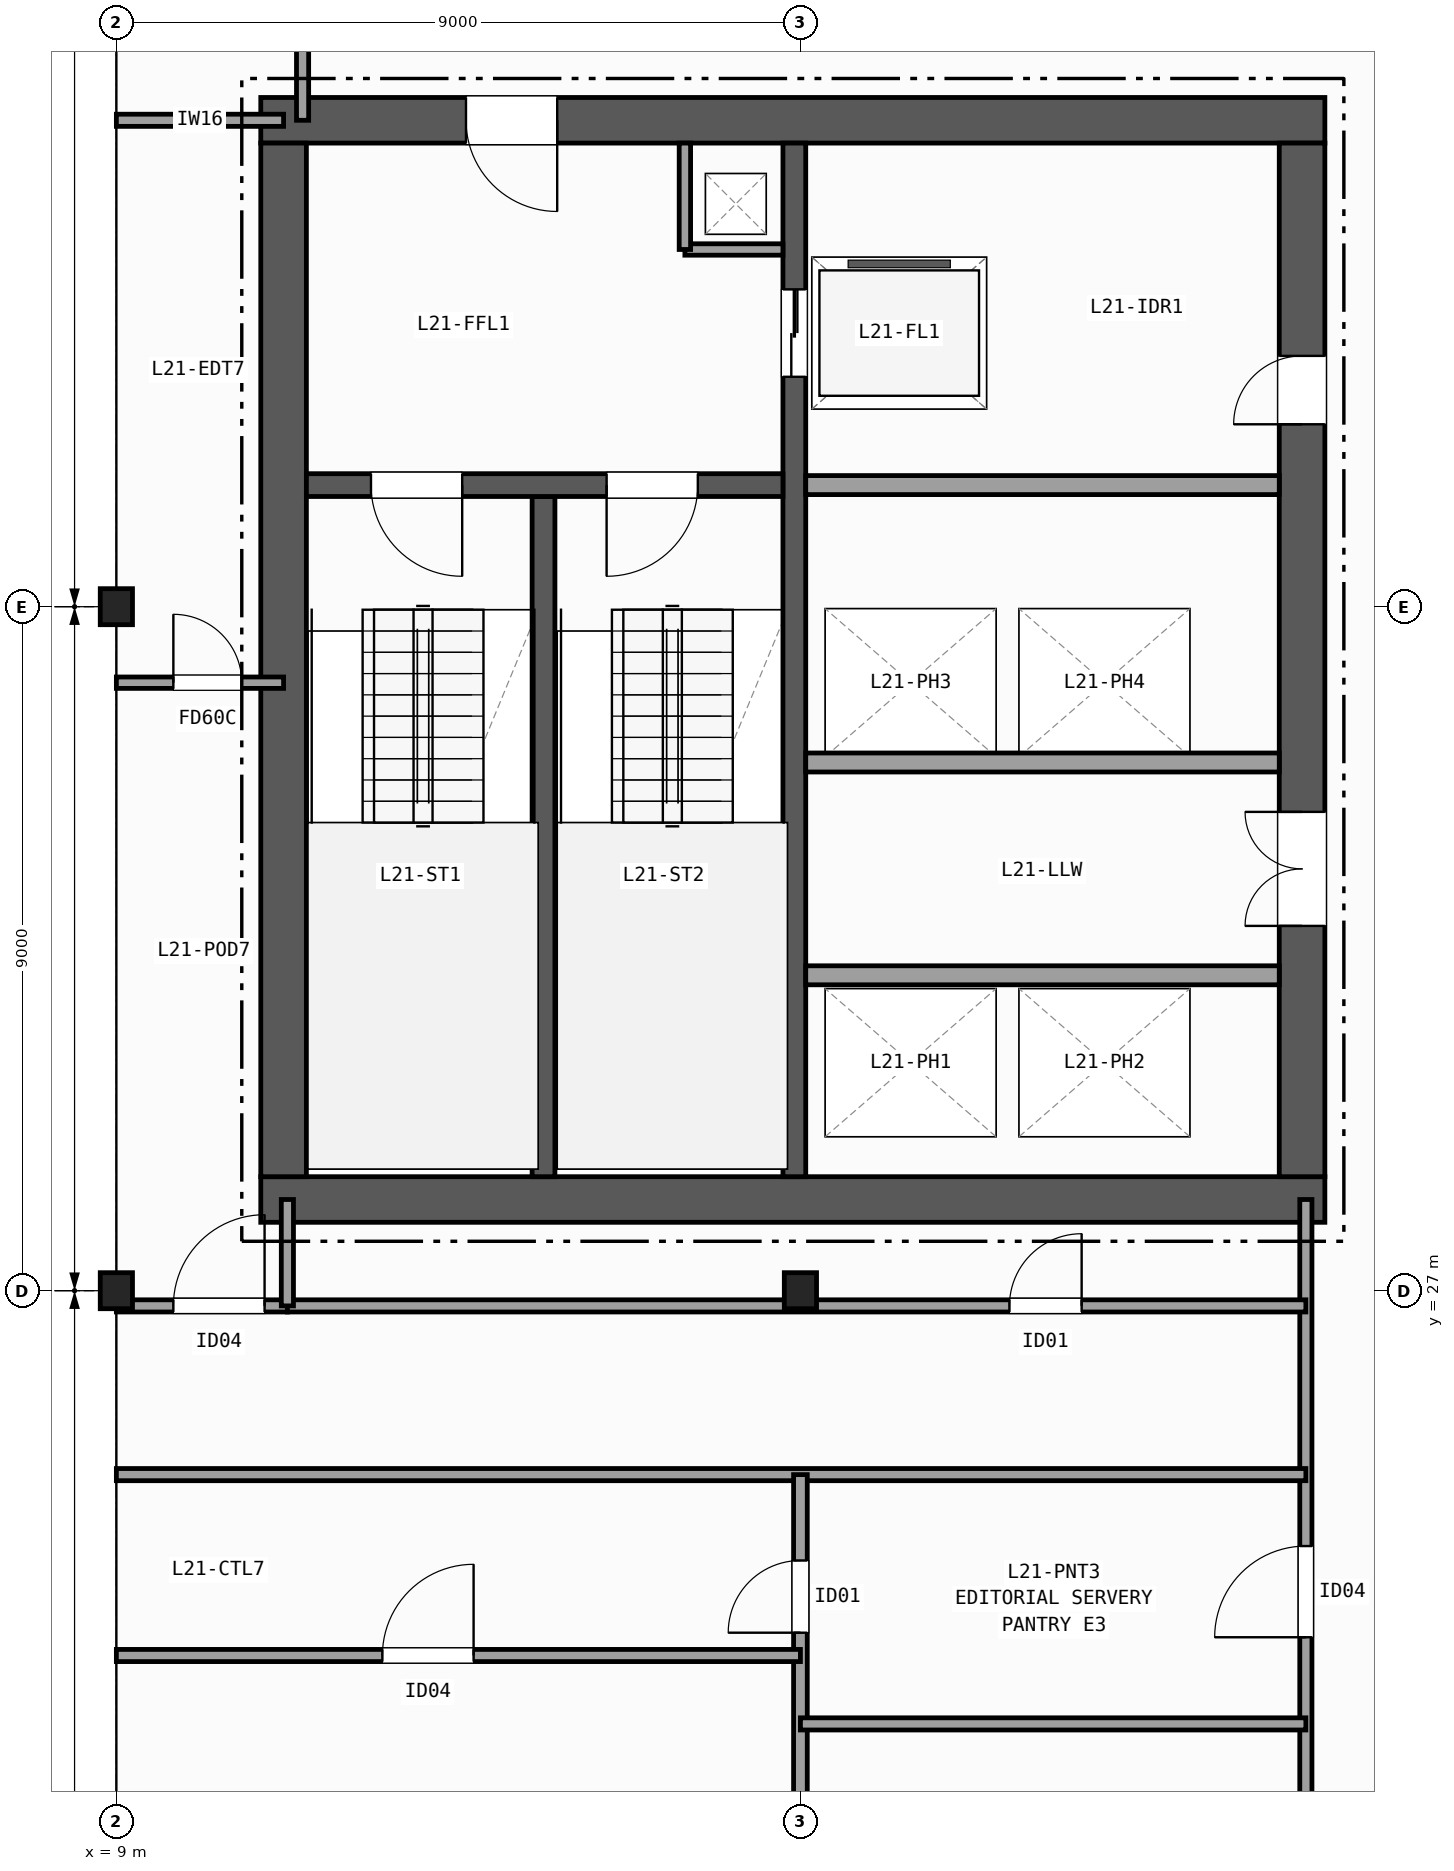
"""IFC4 building model, lengths in metres.
Left out: names, types, materials, properties, quantities, classifications, styles, units other than length and angle.
Written with IfcOpenShell. Run it as: python <this file> out.ifc"""

import sys

from ifc_helpers import new_model, si_unit, direction, frame, frame_2d, origin, origin_2d, place, context, subcontext, project, spatial, rectangle, i_section, extrude, element, fill, save


model = new_model("IFC4")
c1 = context("Model", 3, precision=1e-05, world=origin(), true_north=direction((0.0, 1.0)))
c2 = subcontext(c1, "Body", "Model", "MODEL_VIEW")
j1 = project(units=[si_unit("LENGTHUNIT", "METRE"), si_unit("PLANEANGLEUNIT", "RADIAN")], contexts=[c1])
p1 = place(None, origin())
s1 = spatial("IfcSite", under=j1, at=p1, CompositionType="ELEMENT")
p2 = place(p1, origin())
s2 = spatial("IfcBuilding", under=s1, at=p2, CompositionType="ELEMENT")
p3 = place(p2, frame((0.0, 0.0, 89.1)))
s3 = spatial("IfcBuildingStorey", under=s2, at=p3, CompositionType="ELEMENT", Elevation=89.1)
for number, where, z_axis, x_axis in (
    (1, (9.0, 27.0, 0.0), (0.0, 0.0, 1.0), (1.0, 0.0, 0.0)),
    (2, (9.0, 36.0, 0.0), (0.0, 0.0, 1.0), (1.0, 0.0, 0.0)),
    (3, (18.0, 27.0, 0.0), (0.0, 0.0, 1.0), (1.0, 0.0, 0.0)),
):
    element("IfcColumn", number, at=place(p3, frame(where, z_axis=z_axis, x_axis=x_axis)), inside=s3, PredefinedType="COLUMN", context=c2, shape_type="SweptSolid", body=[
        extrude(i_section(OverallWidth=0.424, OverallDepth=0.474, WebThickness=0.048, FlangeThickness=0.077, FilletRadius=0.015, at=origin_2d()), origin(), (0.0, 0.0, 1.0), 3.7),
    ])
p4 = place(p3, frame((10.9, 28.2, 0.0), z_axis=(0.0, 0.0, 1.0), x_axis=(1.0, 0.0, 0.0)))
e4 = element("IfcWall", 4, at=p4, inside=s3, PredefinedType="SHEAR", context=c2, shape_type="SweptSolid", body=[
    extrude(rectangle(XDim=14.0, YDim=0.6, at=frame_2d((7.0, 0.0))), origin(), (0.0, 0.0, 1.0), 3.42),
])
p5 = place(p3, frame((24.9, 42.4, 0.0), z_axis=(0.0, 0.0, 1.0), x_axis=(-1.0, 0.0, 0.0)))
e5 = element("IfcWall", 5, at=p5, inside=s3, PredefinedType="SHEAR", context=c2, shape_type="SweptSolid", body=[
    extrude(rectangle(XDim=14.0, YDim=0.6, at=frame_2d((7.0, 0.0))), origin(), (0.0, 0.0, 1.0), 3.42),
])
p6 = place(p5, frame((10.1, 0.0, 0.0)))
e6 = element("IfcOpeningElement", 6, at=p6, cuts=e5, PredefinedType="OPENING", context=c2, shape_type="SweptSolid", body=[
    extrude(rectangle(XDim=1.2, YDim=2.15, at=frame_2d((0.6, 1.075))), frame((0.0, 0.31, 0.0), z_axis=(0.0, -1.0, 0.0), x_axis=(1.0, 0.0, 0.0)), (0.0, 0.0, 1.0), 0.62),
])
p7 = place(p3, frame((11.2, 42.1, 0.0), z_axis=(0.0, 0.0, 1.0), x_axis=(0.0, -1.0, 0.0)))
e7 = element("IfcWall", 7, at=p7, inside=s3, PredefinedType="SHEAR", context=c2, shape_type="SweptSolid", body=[
    extrude(rectangle(XDim=13.6, YDim=0.6, at=frame_2d((6.8, 0.0))), origin(), (0.0, 0.0, 1.0), 3.42),
])
p8 = place(p3, frame((24.6, 28.5, 0.0), z_axis=(0.0, 0.0, 1.0), x_axis=(0.0, 1.0, 0.0)))
e8 = element("IfcWall", 8, at=p8, inside=s3, PredefinedType="SHEAR", context=c2, shape_type="SweptSolid", body=[
    extrude(rectangle(XDim=13.6, YDim=0.6, at=frame_2d((6.8, 0.0))), origin(), (0.0, 0.0, 1.0), 3.42),
])
p9 = place(p8, frame((3.3, 0.0, 0.0)))
e9 = element("IfcOpeningElement", 9, at=p9, cuts=e8, PredefinedType="OPENING", context=c2, shape_type="SweptSolid", body=[
    extrude(rectangle(XDim=1.5, YDim=2.2, at=frame_2d((0.75, 1.1))), frame((0.0, 0.31, 0.0), z_axis=(0.0, -1.0, 0.0), x_axis=(1.0, 0.0, 0.0)), (0.0, 0.0, 1.0), 0.62),
])
p10 = place(p8, frame((9.9, 0.0, 0.0)))
e10 = element("IfcOpeningElement", 10, at=p10, cuts=e8, PredefinedType="OPENING", context=c2, shape_type="SweptSolid", body=[
    extrude(rectangle(XDim=0.9, YDim=2.1, at=frame_2d((0.45, 1.05))), frame((0.0, 0.31, 0.0), z_axis=(0.0, -1.0, 0.0), x_axis=(1.0, 0.0, 0.0)), (0.0, 0.0, 1.0), 0.62),
])
p11 = place(p3, frame((14.62, 28.5, 0.0), z_axis=(0.0, 0.0, 1.0), x_axis=(0.0, 1.0, 0.0)))
e11 = element("IfcWall", 11, at=p11, inside=s3, PredefinedType="SHEAR", context=c2, shape_type="SweptSolid", body=[
    extrude(rectangle(XDim=8.95, YDim=0.3, at=frame_2d((4.475, 0.0))), origin(), (0.0, 0.0, 1.0), 3.42),
])
p12 = place(p3, frame((17.92, 42.1, 0.0), z_axis=(0.0, 0.0, 1.0), x_axis=(0.0, -1.0, 0.0)))
e12 = element("IfcWall", 12, at=p12, inside=s3, PredefinedType="SHEAR", context=c2, shape_type="SweptSolid", body=[
    extrude(rectangle(XDim=13.6, YDim=0.3, at=frame_2d((6.8, 0.0))), origin(), (0.0, 0.0, 1.0), 3.42),
])
p13 = place(p12, frame((1.925, 0.0, 0.0)))
e13 = element("IfcOpeningElement", 13, at=p13, cuts=e12, PredefinedType="OPENING", context=c2, shape_type="SweptSolid", body=[
    extrude(rectangle(XDim=1.15, YDim=2.15, at=frame_2d((0.575, 1.075))), frame((0.0, 0.16, 0.0), z_axis=(0.0, -1.0, 0.0), x_axis=(1.0, 0.0, 0.0)), (0.0, 0.0, 1.0), 0.32),
])
p14 = place(p3, frame((17.77, 37.6, 0.0), z_axis=(0.0, 0.0, 1.0), x_axis=(-1.0, 0.0, 0.0)))
e14 = element("IfcWall", 14, at=p14, inside=s3, PredefinedType="SHEAR", context=c2, shape_type="SweptSolid", body=[
    extrude(rectangle(XDim=6.27, YDim=0.3, at=frame_2d((3.135, 0.0))), origin(), (0.0, 0.0, 1.0), 3.42),
])
p15 = place(p14, frame((4.22, 0.0, 0.0)))
e15 = element("IfcOpeningElement", 15, at=p15, cuts=e14, PredefinedType="OPENING", context=c2, shape_type="SweptSolid", body=[
    extrude(rectangle(XDim=1.2, YDim=2.15, at=frame_2d((0.6, 1.075))), frame((0.0, 0.16, 0.0), z_axis=(0.0, -1.0, 0.0), x_axis=(1.0, 0.0, 0.0)), (0.0, 0.0, 1.0), 0.32),
])
p16 = place(p14, frame((1.12, 0.0, 0.0)))
e16 = element("IfcOpeningElement", 16, at=p16, cuts=e14, PredefinedType="OPENING", context=c2, shape_type="SweptSolid", body=[
    extrude(rectangle(XDim=1.2, YDim=2.15, at=frame_2d((0.6, 1.075))), frame((0.0, 0.16, 0.0), z_axis=(0.0, -1.0, 0.0), x_axis=(1.0, 0.0, 0.0)), (0.0, 0.0, 1.0), 0.32),
])
p17 = place(p3, frame((16.48, 40.7, 0.0), z_axis=(0.0, 0.0, 1.0), x_axis=(1.0, 0.0, 0.0)))
e17 = element("IfcWall", 17, at=p17, inside=s3, PredefinedType="PARTITIONING", context=c2, shape_type="SweptSolid", body=[
    extrude(rectangle(XDim=1.29, YDim=0.15, at=frame_2d((0.645, 0.0))), origin(), (0.0, 0.0, 1.0), 3.42),
])
p18 = place(p3, frame((16.48, 40.7, 0.0), z_axis=(0.0, 0.0, 1.0), x_axis=(0.0, 1.0, 0.0)))
e18 = element("IfcWall", 18, at=p18, inside=s3, PredefinedType="PARTITIONING", context=c2, shape_type="SweptSolid", body=[
    extrude(rectangle(XDim=1.4, YDim=0.15, at=frame_2d((0.7, 0.0))), origin(), (0.0, 0.0, 1.0), 3.42),
])
for number, where, z_axis, x_axis in (
    (19, (18.07, 37.6, 0.0), (0.0, 0.0, 1.0), (1.0, 0.0, 0.0)),
    (20, (18.07, 31.15, 0.0), (0.0, 0.0, 1.0), (1.0, 0.0, 0.0)),
    (21, (24.3, 33.95, 0.0), (0.0, 0.0, 1.0), (-1.0, 0.0, 0.0)),
):
    element("IfcWall", number, at=place(p3, frame(where, z_axis=z_axis, x_axis=x_axis)), inside=s3, PredefinedType="PARTITIONING", context=c2, shape_type="SweptSolid", body=[
        extrude(rectangle(XDim=6.23, YDim=0.25, at=frame_2d((3.115, 0.0))), origin(), (0.0, 0.0, 1.0), 3.42),
    ])
p19 = place(p3, frame((9.0, 26.8, 0.0), z_axis=(0.0, 0.0, 1.0), x_axis=(1.0, 0.0, 0.0)))
e22 = element("IfcWall", 22, at=p19, inside=s3, PredefinedType="PARTITIONING", context=c2, shape_type="SweptSolid", body=[
    extrude(rectangle(XDim=2.25, YDim=0.16, at=frame_2d((1.125, 0.0))), origin(), (0.0, 0.0, 1.0), 2.627),
])
p20 = place(p19, frame((0.75, 0.0, 0.0)))
e23 = element("IfcOpeningElement", 23, at=p20, cuts=e22, PredefinedType="OPENING", context=c2, shape_type="SweptSolid", body=[
    extrude(rectangle(XDim=1.2, YDim=2.15, at=frame_2d((0.6, 1.075))), frame((0.0, 0.09, 0.0), z_axis=(0.0, -1.0, 0.0), x_axis=(1.0, 0.0, 0.0)), (0.0, 0.0, 1.0), 0.18),
])
p21 = place(p3, frame((9.0, 42.4, 0.0), z_axis=(0.0, 0.0, 1.0), x_axis=(1.0, 0.0, 0.0)))
e24 = element("IfcWall", 24, at=p21, inside=s3, PredefinedType="PARTITIONING", context=c2, shape_type="SweptSolid", body=[
    extrude(rectangle(XDim=2.2, YDim=0.16, at=frame_2d((1.1, 0.0))), origin(), (0.0, 0.0, 1.0), 2.627),
])
p22 = place(p3, frame((11.45, 42.4, 0.0), z_axis=(0.0, 0.0, 1.0), x_axis=(0.0, 1.0, 0.0)))
e25 = element("IfcWall", 25, at=p22, inside=s3, PredefinedType="PARTITIONING", context=c2, shape_type="SweptSolid", body=[
    extrude(rectangle(XDim=2.1, YDim=0.16, at=frame_2d((1.05, 0.0))), origin(), (0.0, 0.0, 1.0), 3.42),
])
p23 = place(p3, frame((9.0, 35.0, 0.0), z_axis=(0.0, 0.0, 1.0), x_axis=(1.0, 0.0, 0.0)))
e26 = element("IfcWall", 26, at=p23, inside=s3, PredefinedType="PARTITIONING", context=c2, shape_type="SweptSolid", body=[
    extrude(rectangle(XDim=2.2, YDim=0.15, at=frame_2d((1.1, 0.0))), origin(), (0.0, 0.0, 1.0), 2.627),
])
p24 = place(p23, frame((0.75, 0.0, 0.0)))
e27 = element("IfcOpeningElement", 27, at=p24, cuts=e26, PredefinedType="OPENING", context=c2, shape_type="SweptSolid", body=[
    extrude(rectangle(XDim=0.9, YDim=2.1, at=frame_2d((0.45, 1.05))), frame((0.0, 0.085, 0.0), z_axis=(0.0, -1.0, 0.0), x_axis=(1.0, 0.0, 0.0)), (0.0, 0.0, 1.0), 0.17),
])
p25 = place(p3, frame((24.65, 9.0, 0.0), z_axis=(0.0, 0.0, 1.0), x_axis=(0.0, 1.0, 0.0)))
e28 = element("IfcWall", 28, at=p25, inside=s3, PredefinedType="PARTITIONING", context=c2, shape_type="SweptSolid", body=[
    extrude(rectangle(XDim=19.2, YDim=0.16, at=frame_2d((9.6, 0.0))), origin(), (0.0, 0.0, 1.0), 2.627),
])
p26 = place(p25, frame((2.8, 0.0, 0.0)))
e29 = element("IfcOpeningElement", 29, at=p26, cuts=e28, PredefinedType="OPENING", context=c2, shape_type="SweptSolid", body=[
    extrude(rectangle(XDim=1.0, YDim=2.1, at=frame_2d((0.5, 1.05))), frame((0.0, 0.09, 0.0), z_axis=(0.0, -1.0, 0.0), x_axis=(1.0, 0.0, 0.0)), (0.0, 0.0, 1.0), 0.18),
])
p27 = place(p25, frame((8.95, 0.0, 0.0)))
e30 = element("IfcOpeningElement", 30, at=p27, cuts=e28, PredefinedType="OPENING", context=c2, shape_type="SweptSolid", body=[
    extrude(rectangle(XDim=1.05, YDim=2.15, at=frame_2d((0.525, 1.075))), frame((0.0, 0.09, 0.0), z_axis=(0.0, -1.0, 0.0), x_axis=(1.0, 0.0, 0.0)), (0.0, 0.0, 1.0), 0.18),
])
p28 = place(p25, frame((13.44, 0.0, 0.0)))
e31 = element("IfcOpeningElement", 31, at=p28, cuts=e28, PredefinedType="OPENING", context=c2, shape_type="SweptSolid", body=[
    extrude(rectangle(XDim=1.2, YDim=2.15, at=frame_2d((0.6, 1.075))), frame((0.0, 0.09, 0.0), z_axis=(0.0, -1.0, 0.0), x_axis=(1.0, 0.0, 0.0)), (0.0, 0.0, 1.0), 0.18),
])
p29 = place(p3, frame((9.0, 24.58, 0.0), z_axis=(0.0, 0.0, 1.0), x_axis=(1.0, 0.0, 0.0)))
e32 = element("IfcWall", 32, at=p29, inside=s3, PredefinedType="PARTITIONING", context=c2, shape_type="SweptSolid", body=[
    extrude(rectangle(XDim=15.65, YDim=0.16, at=frame_2d((7.825, 0.0))), origin(), (0.0, 0.0, 1.0), 2.627),
])
p30 = place(p3, frame((11.25, 26.8, 0.0), z_axis=(0.0, 0.0, 1.0), x_axis=(1.0, 0.0, 0.0)))
e33 = element("IfcWall", 33, at=p30, inside=s3, PredefinedType="PARTITIONING", context=c2, shape_type="SweptSolid", body=[
    extrude(rectangle(XDim=13.4, YDim=0.16, at=frame_2d((6.7, 0.0))), origin(), (0.0, 0.0, 1.0), 2.789),
])
p31 = place(p30, frame((9.5, 0.0, 0.0)))
e34 = element("IfcOpeningElement", 34, at=p31, cuts=e33, PredefinedType="OPENING", context=c2, shape_type="SweptSolid", body=[
    extrude(rectangle(XDim=0.95, YDim=2.1, at=frame_2d((0.475, 1.05))), frame((0.0, 0.09, 0.0), z_axis=(0.0, -1.0, 0.0), x_axis=(1.0, 0.0, 0.0)), (0.0, 0.0, 1.0), 0.18),
])
p32 = place(p3, frame((11.25, 26.8, 0.0), z_axis=(0.0, 0.0, 1.0), x_axis=(0.0, 1.0, 0.0)))
e35 = element("IfcWall", 35, at=p32, inside=s3, PredefinedType="PARTITIONING", context=c2, shape_type="SweptSolid", body=[
    extrude(rectangle(XDim=1.4, YDim=0.16, at=frame_2d((0.7, 0.0))), origin(), (0.0, 0.0, 1.0), 2.789),
])
p33 = place(p3, frame((18.0, 9.0, 0.0), z_axis=(0.0, 0.0, 1.0), x_axis=(0.0, 1.0, 0.0)))
e36 = element("IfcWall", 36, at=p33, inside=s3, PredefinedType="PARTITIONING", context=c2, shape_type="SweptSolid", body=[
    extrude(rectangle(XDim=15.58, YDim=0.18, at=frame_2d((7.79, 0.0))), origin(), (0.0, 0.0, 1.0), 2.627),
])
p34 = place(p33, frame((2.2, 0.0, 0.0)))
e37 = element("IfcOpeningElement", 37, at=p34, cuts=e36, PredefinedType="OPENING", context=c2, shape_type="SweptSolid", body=[
    extrude(rectangle(XDim=0.86, YDim=2.05, at=frame_2d((0.43, 1.025))), frame((0.0, 0.1, 0.0), z_axis=(0.0, -1.0, 0.0), x_axis=(1.0, 0.0, 0.0)), (0.0, 0.0, 1.0), 0.2),
])
p35 = place(p33, frame((13.5, 0.0, 0.0)))
e38 = element("IfcOpeningElement", 38, at=p35, cuts=e36, PredefinedType="OPENING", context=c2, shape_type="SweptSolid", body=[
    extrude(rectangle(XDim=0.95, YDim=2.1, at=frame_2d((0.475, 1.05))), frame((0.0, 0.1, 0.0), z_axis=(0.0, -1.0, 0.0), x_axis=(1.0, 0.0, 0.0)), (0.0, 0.0, 1.0), 0.2),
])
p36 = place(p3, frame((18.0, 21.3, 0.0), z_axis=(0.0, 0.0, 1.0), x_axis=(1.0, 0.0, 0.0)))
e39 = element("IfcWall", 39, at=p36, inside=s3, PredefinedType="PARTITIONING", context=c2, shape_type="SweptSolid", body=[
    extrude(rectangle(XDim=6.65, YDim=0.16, at=frame_2d((3.325, 0.0))), origin(), (0.0, 0.0, 1.0), 2.792),
])
p37 = place(p3, frame((9.0, 22.2, 0.0), z_axis=(0.0, 0.0, 1.0), x_axis=(1.0, 0.0, 0.0)))
e40 = element("IfcWall", 40, at=p37, inside=s3, PredefinedType="PARTITIONING", context=c2, shape_type="SweptSolid", body=[
    extrude(rectangle(XDim=9.0, YDim=0.16, at=frame_2d((4.5, 0.0))), origin(), (0.0, 0.0, 1.0), 2.627),
])
p38 = place(p37, frame((3.5, 0.0, 0.0)))
e41 = element("IfcOpeningElement", 41, at=p38, cuts=e40, PredefinedType="OPENING", context=c2, shape_type="SweptSolid", body=[
    extrude(rectangle(XDim=1.2, YDim=2.15, at=frame_2d((0.6, 1.075))), frame((0.0, 0.09, 0.0), z_axis=(0.0, -1.0, 0.0), x_axis=(1.0, 0.0, 0.0)), (0.0, 0.0, 1.0), 0.18),
])
p39 = place(p15, origin())
e42 = element("IfcDoor", 42, at=p39, inside=s3, OperationType="SINGLE_SWING_LEFT", PredefinedType="DOOR", context=c2, shape_type="SweptSolid", body=[
    extrude(rectangle(XDim=1.2, YDim=2.15, at=frame_2d((0.6, 1.075))), frame((0.0, 0.025, 0.0), z_axis=(0.0, -1.0, 0.0), x_axis=(1.0, 0.0, 0.0)), (0.0, 0.0, 1.0), 0.05),
])
fill(e15, e42)
p40 = place(p16, origin())
e43 = element("IfcDoor", 43, at=p40, inside=s3, OperationType="SINGLE_SWING_RIGHT", PredefinedType="DOOR", context=c2, shape_type="SweptSolid", body=[
    extrude(rectangle(XDim=1.2, YDim=2.15, at=frame_2d((0.6, 1.075))), frame((0.0, 0.025, 0.0), z_axis=(0.0, -1.0, 0.0), x_axis=(1.0, 0.0, 0.0)), (0.0, 0.0, 1.0), 0.05),
])
fill(e16, e43)
p41 = place(p9, origin())
e44 = element("IfcDoor", 44, at=p41, inside=s3, OperationType="DOUBLE_DOOR_SINGLE_SWING", PredefinedType="DOOR", context=c2, shape_type="SweptSolid", body=[
    extrude(rectangle(XDim=1.5, YDim=2.2, at=frame_2d((0.75, 1.1))), frame((0.0, 0.025, 0.0), z_axis=(0.0, -1.0, 0.0), x_axis=(1.0, 0.0, 0.0)), (0.0, 0.0, 1.0), 0.05),
])
fill(e9, e44)
p42 = place(p6, origin())
e45 = element("IfcDoor", 45, at=p42, inside=s3, OperationType="SINGLE_SWING_LEFT", PredefinedType="DOOR", context=c2, shape_type="SweptSolid", body=[
    extrude(rectangle(XDim=1.2, YDim=2.15, at=frame_2d((0.6, 1.075))), frame((0.0, 0.025, 0.0), z_axis=(0.0, -1.0, 0.0), x_axis=(1.0, 0.0, 0.0)), (0.0, 0.0, 1.0), 0.05),
])
fill(e6, e45)
p43 = place(p10, origin())
e46 = element("IfcDoor", 46, at=p43, inside=s3, OperationType="SINGLE_SWING_LEFT", PredefinedType="DOOR", context=c2, shape_type="SweptSolid", body=[
    extrude(rectangle(XDim=0.9, YDim=2.1, at=frame_2d((0.45, 1.05))), frame((0.0, 0.025, 0.0), z_axis=(0.0, -1.0, 0.0), x_axis=(1.0, 0.0, 0.0)), (0.0, 0.0, 1.0), 0.05),
])
fill(e10, e46)
p44 = place(p13, origin())
e47 = element("IfcDoor", 47, at=p44, inside=s3, OperationType="DOUBLE_DOOR_SLIDING", PredefinedType="DOOR", context=c2, shape_type="SweptSolid", body=[
    extrude(rectangle(XDim=1.15, YDim=2.15, at=frame_2d((0.575, 1.075))), frame((0.0, 0.025, 0.0), z_axis=(0.0, -1.0, 0.0), x_axis=(1.0, 0.0, 0.0)), (0.0, 0.0, 1.0), 0.05),
])
fill(e13, e47)
p45 = place(p20, origin())
e48 = element("IfcDoor", 48, at=p45, inside=s3, OperationType="SINGLE_SWING_RIGHT", PredefinedType="DOOR", context=c2, shape_type="SweptSolid", body=[
    extrude(rectangle(XDim=1.2, YDim=2.15, at=frame_2d((0.6, 1.075))), frame((0.0, 0.025, 0.0), z_axis=(0.0, -1.0, 0.0), x_axis=(1.0, 0.0, 0.0)), (0.0, 0.0, 1.0), 0.05),
])
fill(e23, e48)
p46 = place(p24, origin())
e49 = element("IfcDoor", 49, at=p46, inside=s3, OperationType="SINGLE_SWING_LEFT", PredefinedType="DOOR", context=c2, shape_type="SweptSolid", body=[
    extrude(rectangle(XDim=0.9, YDim=2.1, at=frame_2d((0.45, 1.05))), frame((0.0, 0.025, 0.0), z_axis=(0.0, -1.0, 0.0), x_axis=(1.0, 0.0, 0.0)), (0.0, 0.0, 1.0), 0.05),
])
fill(e27, e49)
p47 = place(p31, origin())
e50 = element("IfcDoor", 50, at=p47, inside=s3, OperationType="SINGLE_SWING_RIGHT", PredefinedType="DOOR", context=c2, shape_type="SweptSolid", body=[
    extrude(rectangle(XDim=0.95, YDim=2.1, at=frame_2d((0.475, 1.05))), frame((0.0, 0.025, 0.0), z_axis=(0.0, -1.0, 0.0), x_axis=(1.0, 0.0, 0.0)), (0.0, 0.0, 1.0), 0.05),
])
fill(e34, e50)
p48 = place(p28, origin())
e51 = element("IfcDoor", 51, at=p48, inside=s3, OperationType="SINGLE_SWING_LEFT", PredefinedType="DOOR", context=c2, shape_type="SweptSolid", body=[
    extrude(rectangle(XDim=1.2, YDim=2.15, at=frame_2d((0.6, 1.075))), frame((0.0, 0.025, 0.0), z_axis=(0.0, -1.0, 0.0), x_axis=(1.0, 0.0, 0.0)), (0.0, 0.0, 1.0), 0.05),
])
fill(e31, e51)
p49 = place(p35, origin())
e52 = element("IfcDoor", 52, at=p49, inside=s3, OperationType="SINGLE_SWING_LEFT", PredefinedType="DOOR", context=c2, shape_type="SweptSolid", body=[
    extrude(rectangle(XDim=0.95, YDim=2.1, at=frame_2d((0.475, 1.05))), frame((0.0, 0.025, 0.0), z_axis=(0.0, -1.0, 0.0), x_axis=(1.0, 0.0, 0.0)), (0.0, 0.0, 1.0), 0.05),
])
fill(e38, e52)
p50 = place(p38, origin())
e53 = element("IfcDoor", 53, at=p50, inside=s3, OperationType="SINGLE_SWING_RIGHT", PredefinedType="DOOR", context=c2, shape_type="SweptSolid", body=[
    extrude(rectangle(XDim=1.2, YDim=2.15, at=frame_2d((0.6, 1.075))), frame((0.0, 0.025, 0.0), z_axis=(0.0, -1.0, 0.0), x_axis=(1.0, 0.0, 0.0)), (0.0, 0.0, 1.0), 0.05),
])
fill(e41, e53)
save(model, sys.argv[1])
